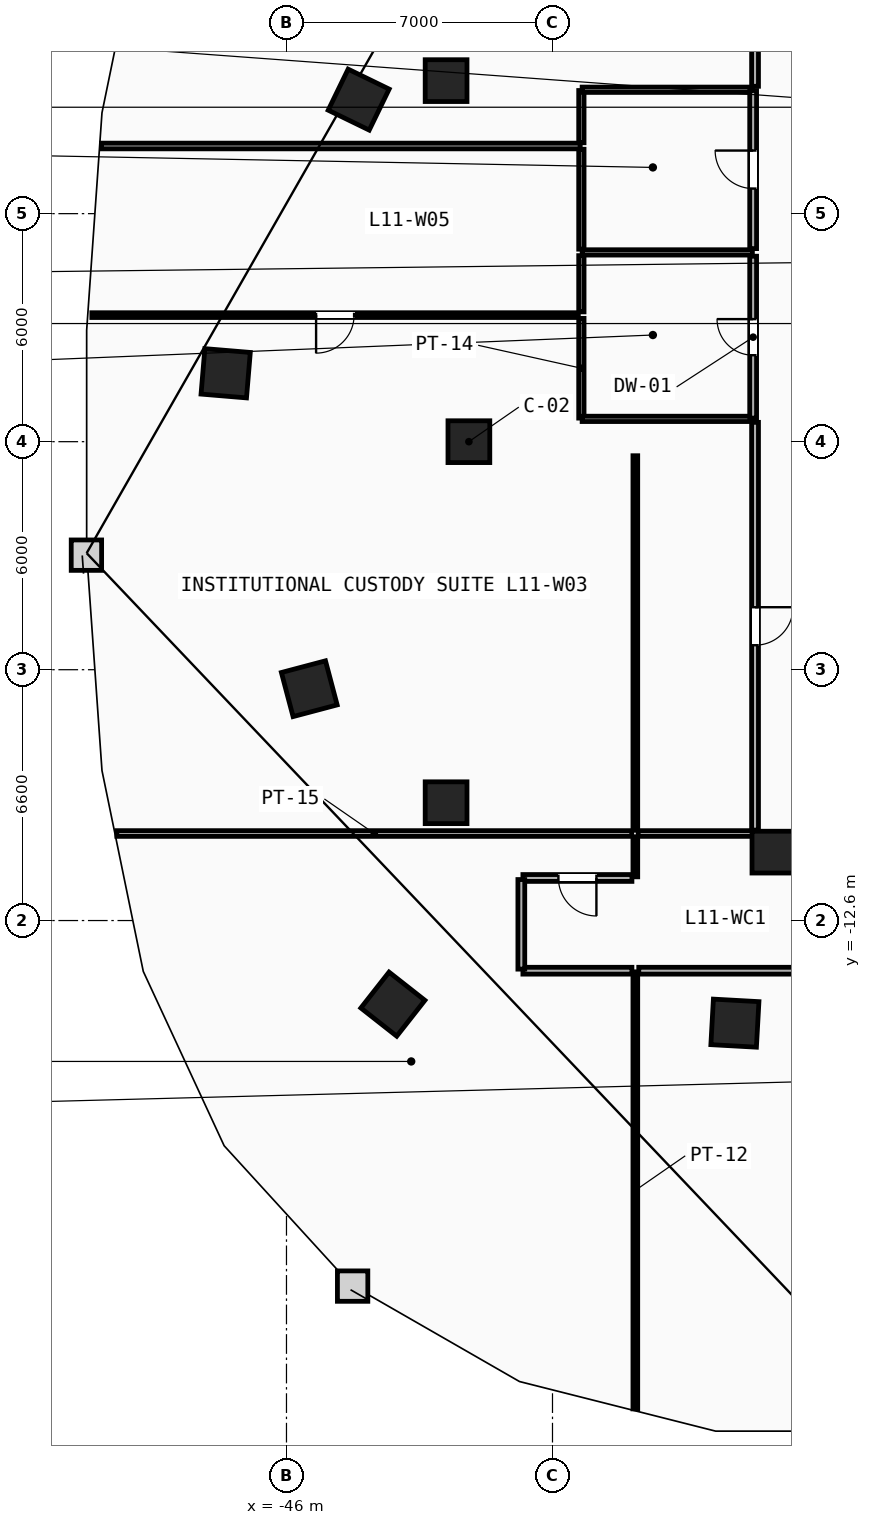
"""IFC4 building model, lengths in metres.
Left out: names, types, materials, properties, quantities, classifications, styles, units other than length and angle.
Written with IfcOpenShell. Run it as: python <this file> out.ifc"""

import sys

from ifc_helpers import new_model, si_unit, direction, frame, frame_2d, origin, origin_2d, place, context, subcontext, project, spatial, rectangle, extrude, element, fill, save


model = new_model("IFC4")
c1 = context("Model", 3, precision=1e-05, world=origin(), true_north=direction((0.0, 1.0)))
c2 = subcontext(c1, "Body", "Model", "MODEL_VIEW")
j1 = project(units=[si_unit("LENGTHUNIT", "METRE"), si_unit("PLANEANGLEUNIT", "RADIAN")], contexts=[c1])
p1 = place(None, origin())
s1 = spatial("IfcSite", under=j1, at=p1, CompositionType="ELEMENT")
p2 = place(p1, origin())
s2 = spatial("IfcBuilding", under=s1, at=p2, CompositionType="ELEMENT")
p3 = place(p2, frame((0.0, 0.0, 46.8)))
s3 = spatial("IfcBuildingStorey", under=s2, at=p3, CompositionType="ELEMENT", Elevation=46.8)
for number, where, z_axis, x_axis in (
    (1, (-41.2, 0.0, 0.0), (0.0, 0.0, 1.0), (1.0, 0.0, 0.0)),
    (2, (-41.8, 9.5, 0.0), (0.0, 0.0, 1.0), (1.0, 0.0, 0.0)),
    (3, (-41.8, -9.5, 0.0), (0.0, 0.0, 1.0), (1.0, 0.0, 0.0)),
    (4, (-33.2, -10.8, 0.0), (0.0, 0.0, 1.0), (1.0, 0.0, 0.0)),
):
    element("IfcColumn", number, at=place(p3, frame(where, z_axis=z_axis, x_axis=x_axis)), inside=s3, PredefinedType="COLUMN", context=c2, shape_type="SweptSolid", body=[
        extrude(rectangle(XDim=1.1, YDim=1.1, at=origin_2d()), origin(), (0.0, 0.0, 1.0), 3.8),
    ])
for number, where, z_axis, x_axis in (
    (5, (-44.1, 9.0, 0.0), (0.0, 0.0, 1.0), (-0.437, -0.899, 0.0)),
    (6, (-47.6, 1.8, 0.0), (0.0, 0.0, 1.0), (-0.084, -0.997, 0.0)),
    (7, (-45.4, -6.5, 0.0), (0.0, 0.0, 1.0), (0.256, -0.967, 0.0)),
    (8, (-43.2, -14.8, 0.0), (0.0, 0.0, 1.0), (0.786, -0.618, 0.0)),
    (9, (-34.2, -15.3, 0.0), (0.0, 0.0, 1.0), (0.998, -0.055, 0.0)),
):
    element("IfcColumn", number, at=place(p3, frame(where, z_axis=z_axis, x_axis=x_axis)), inside=s3, PredefinedType="COLUMN", context=c2, shape_type="SweptSolid", body=[
        extrude(rectangle(XDim=1.2, YDim=1.2, at=origin_2d()), origin(), (0.0, 0.0, 1.0), 3.8),
    ])
p4 = place(p3, frame((-38.24, 0.62, 0.0), z_axis=(0.0, 0.0, 1.0), x_axis=(0.0, 1.0, 0.0)))
e10 = element("IfcWall", 10, at=p4, inside=s3, PredefinedType="PARTITIONING", context=c2, shape_type="SweptSolid", body=[
    extrude(rectangle(XDim=2.625, YDim=0.14, at=frame_2d((1.312, 0.0))), origin(), (0.0, 0.0, 1.0), 3.5),
])
p5 = place(p3, frame((-38.24, 3.415, 0.0), z_axis=(0.0, 0.0, 1.0), x_axis=(0.0, 1.0, 0.0)))
e11 = element("IfcWall", 11, at=p5, inside=s3, PredefinedType="PARTITIONING", context=c2, shape_type="SweptSolid", body=[
    extrude(rectangle(XDim=1.48, YDim=0.14, at=frame_2d((0.74, 0.0))), origin(), (0.0, 0.0, 1.0), 3.5),
])
p6 = place(p3, frame((-38.24, 5.065, 0.0), z_axis=(0.0, 0.0, 1.0), x_axis=(0.0, 1.0, 0.0)))
e12 = element("IfcWall", 12, at=p6, inside=s3, PredefinedType="PARTITIONING", context=c2, shape_type="SweptSolid", body=[
    extrude(rectangle(XDim=2.63, YDim=0.14, at=frame_2d((1.315, 0.0))), origin(), (0.0, 0.0, 1.0), 3.5),
])
p7 = place(p3, frame((-38.24, 7.865, 0.0), z_axis=(0.0, 0.0, 1.0), x_axis=(0.0, 1.0, 0.0)))
e13 = element("IfcWall", 13, at=p7, inside=s3, PredefinedType="PARTITIONING", context=c2, shape_type="SweptSolid", body=[
    extrude(rectangle(XDim=1.375, YDim=0.14, at=frame_2d((0.688, 0.0))), origin(), (0.0, 0.0, 1.0), 3.5),
])
for number, where, z_axis, x_axis in (
    (14, (-38.22, 0.6, 0.0), (0.0, 0.0, 1.0), (1.0, 0.0, 0.0)),
    (15, (-38.22, 4.98, 0.0), (0.0, 0.0, 1.0), (1.0, 0.0, 0.0)),
    (16, (-38.22, 9.26, 0.0), (0.0, 0.0, 1.0), (1.0, 0.0, 0.0)),
):
    element("IfcWall", number, at=place(p3, frame(where, z_axis=z_axis, x_axis=x_axis)), inside=s3, PredefinedType="PARTITIONING", context=c2, shape_type="SweptSolid", body=[
        extrude(rectangle(XDim=4.48, YDim=0.14, at=frame_2d((2.24, 0.0))), origin(), (0.0, 0.0, 1.0), 3.5),
    ])
p8 = place(p3, frame((-33.72, 0.62, 0.0), z_axis=(0.0, 0.0, 1.0), x_axis=(0.0, 1.0, 0.0)))
e17 = element("IfcWall", 17, at=p8, inside=s3, PredefinedType="PARTITIONING", context=c2, shape_type="SweptSolid", body=[
    extrude(rectangle(XDim=4.26, YDim=0.18, at=frame_2d((2.13, 0.0))), origin(), (0.0, 0.0, 1.0), 3.5),
])
p9 = place(p8, frame((1.655, 0.0, 0.0)))
e18 = element("IfcOpeningElement", 18, at=p9, cuts=e17, PredefinedType="OPENING", context=c2, shape_type="SweptSolid", body=[
    extrude(rectangle(XDim=0.95, YDim=2.1, at=frame_2d((0.475, 1.05))), frame((0.0, 0.1, 0.0), z_axis=(0.0, -1.0, 0.0), x_axis=(1.0, 0.0, 0.0)), (0.0, 0.0, 1.0), 0.2),
])
p10 = place(p3, frame((-33.72, 5.08, 0.0), z_axis=(0.0, 0.0, 1.0), x_axis=(0.0, 1.0, 0.0)))
e19 = element("IfcWall", 19, at=p10, inside=s3, PredefinedType="PARTITIONING", context=c2, shape_type="SweptSolid", body=[
    extrude(rectangle(XDim=4.16, YDim=0.18, at=frame_2d((2.08, 0.0))), origin(), (0.0, 0.0, 1.0), 3.5),
])
p11 = place(p10, frame((1.58, 0.0, 0.0)))
e20 = element("IfcOpeningElement", 20, at=p11, cuts=e19, PredefinedType="OPENING", context=c2, shape_type="SweptSolid", body=[
    extrude(rectangle(XDim=1.0, YDim=2.15, at=frame_2d((0.5, 1.075))), frame((0.0, 0.1, 0.0), z_axis=(0.0, -1.0, 0.0), x_axis=(1.0, 0.0, 0.0)), (0.0, 0.0, 1.0), 0.2),
])
p12 = place(p3, frame((-36.82, -25.45, 0.0), z_axis=(0.0, 0.0, 1.0), x_axis=(0.0, 1.0, 0.0)))
e21 = element("IfcWall", 21, at=p12, inside=s3, PredefinedType="PARTITIONING", context=c2, shape_type="SweptSolid", body=[
    extrude(rectangle(XDim=11.5, YDim=0.125, at=frame_2d((5.75, 0.0))), origin(), (0.0, 0.0, 1.0), 3.5),
])
p13 = place(p3, frame((-36.82, -11.45, 0.0), z_axis=(0.0, 0.0, 1.0), x_axis=(0.0, 1.0, 0.0)))
e22 = element("IfcWall", 22, at=p13, inside=s3, PredefinedType="PARTITIONING", context=c2, shape_type="SweptSolid", body=[
    extrude(rectangle(XDim=1.055, YDim=0.125, at=frame_2d((0.527, 0.0))), origin(), (0.0, 0.0, 1.0), 3.5),
])
p14 = place(p3, frame((-36.82, -10.225, 0.0), z_axis=(0.0, 0.0, 1.0), x_axis=(0.0, 1.0, 0.0)))
e23 = element("IfcWall", 23, at=p14, inside=s3, PredefinedType="PARTITIONING", context=c2, shape_type="SweptSolid", body=[
    extrude(rectangle(XDim=9.855, YDim=0.125, at=frame_2d((4.927, 0.0))), origin(), (0.0, 0.0, 1.0), 3.5),
])
p15 = place(p3, frame((-50.464, -10.31, 0.0), z_axis=(0.0, 0.0, 1.0), x_axis=(1.0, 0.0, 0.0)))
e24 = element("IfcWall", 24, at=p15, inside=s3, PredefinedType="PARTITIONING", context=c2, shape_type="SweptSolid", body=[
    extrude(rectangle(XDim=13.549, YDim=0.15, at=frame_2d((6.774, 0.0))), origin(), (0.0, 0.0, 1.0), 2.805),
])
p16 = place(p3, frame((-36.745, -10.31, 0.0), z_axis=(0.0, 0.0, 1.0), x_axis=(1.0, 0.0, 0.0)))
e25 = element("IfcWall", 25, at=p16, inside=s3, PredefinedType="PARTITIONING", context=c2, shape_type="SweptSolid", body=[
    extrude(rectangle(XDim=3.045, YDim=0.15, at=frame_2d((1.522, 0.0))), origin(), (0.0, 0.0, 1.0), 2.805),
])
p17 = place(p3, frame((-50.866, 7.78, 0.0), z_axis=(0.0, 0.0, 1.0), x_axis=(1.0, 0.0, 0.0)))
e26 = element("IfcWall", 26, at=p17, inside=s3, PredefinedType="PARTITIONING", context=c2, shape_type="SweptSolid", body=[
    extrude(rectangle(XDim=12.596, YDim=0.15, at=frame_2d((6.298, 0.0))), origin(), (0.0, 0.0, 1.0), 3.5),
])
p18 = place(p3, frame((-36.73, -13.92, 0.0), z_axis=(0.0, 0.0, 1.0), x_axis=(1.0, 0.0, 0.0)))
e27 = element("IfcWall", 27, at=p18, inside=s3, PredefinedType="PARTITIONING", context=c2, shape_type="SweptSolid", body=[
    extrude(rectangle(XDim=11.509, YDim=0.18, at=frame_2d((5.754, 0.0))), origin(), (0.0, 0.0, 1.0), 3.5),
])
p19 = place(p18, frame((5.254, 0.0, 0.0)))
e28 = element("IfcOpeningElement", 28, at=p19, cuts=e27, PredefinedType="OPENING", context=c2, shape_type="SweptSolid", body=[
    extrude(rectangle(XDim=1.0, YDim=2.15, at=frame_2d((0.5, 1.075))), frame((0.0, 0.1, 0.0), z_axis=(0.0, -1.0, 0.0), x_axis=(1.0, 0.0, 0.0)), (0.0, 0.0, 1.0), 0.2),
])
p20 = place(p3, frame((-36.91, -11.48, 0.0), z_axis=(0.0, 0.0, 1.0), x_axis=(-1.0, 0.0, 0.0)))
e29 = element("IfcWall", 29, at=p20, inside=s3, PredefinedType="PARTITIONING", context=c2, shape_type="SweptSolid", body=[
    extrude(rectangle(XDim=2.869, YDim=0.18, at=frame_2d((1.434, 0.0))), origin(), (0.0, 0.0, 1.0), 3.5),
])
p21 = place(p20, frame((0.934, 0.0, 0.0)))
e30 = element("IfcOpeningElement", 30, at=p21, cuts=e29, PredefinedType="OPENING", context=c2, shape_type="SweptSolid", body=[
    extrude(rectangle(XDim=1.0, YDim=2.15, at=frame_2d((0.5, 1.075))), frame((0.0, 0.1, 0.0), z_axis=(0.0, -1.0, 0.0), x_axis=(1.0, 0.0, 0.0)), (0.0, 0.0, 1.0), 0.2),
])
p22 = place(p3, frame((-39.779, -13.92, 0.0), z_axis=(0.0, 0.0, 1.0), x_axis=(1.0, 0.0, 0.0)))
e31 = element("IfcWall", 31, at=p22, inside=s3, PredefinedType="PARTITIONING", context=c2, shape_type="SweptSolid", body=[
    extrude(rectangle(XDim=2.869, YDim=0.18, at=frame_2d((1.434, 0.0))), origin(), (0.0, 0.0, 1.0), 3.5),
])
p23 = place(p3, frame((-39.82, -11.521, 0.0), z_axis=(0.0, 0.0, 1.0), x_axis=(0.0, -1.0, 0.0)))
e32 = element("IfcWall", 32, at=p23, inside=s3, PredefinedType="PARTITIONING", context=c2, shape_type="SweptSolid", body=[
    extrude(rectangle(XDim=2.357, YDim=0.18, at=frame_2d((1.178, 0.0))), origin(), (0.0, 0.0, 1.0), 3.5),
])
p24 = place(p3, frame((-33.67, 0.509, 0.0), z_axis=(0.0, 0.0, 1.0), x_axis=(0.0, -1.0, 0.0)))
e33 = element("IfcWall", 33, at=p24, inside=s3, PredefinedType="PARTITIONING", context=c2, shape_type="SweptSolid", body=[
    extrude(rectangle(XDim=10.729, YDim=0.18, at=frame_2d((5.364, 0.0))), origin(), (0.0, 0.0, 1.0), 3.5),
])
p25 = place(p24, frame((4.864, 0.0, 0.0)))
e34 = element("IfcOpeningElement", 34, at=p25, cuts=e33, PredefinedType="OPENING", context=c2, shape_type="SweptSolid", body=[
    extrude(rectangle(XDim=1.0, YDim=2.15, at=frame_2d((0.5, 1.075))), frame((0.0, 0.1, 0.0), z_axis=(0.0, -1.0, 0.0), x_axis=(1.0, 0.0, 0.0)), (0.0, 0.0, 1.0), 0.2),
])
p26 = place(p3, frame((-33.67, 17.428, 0.0), z_axis=(0.0, 0.0, 1.0), x_axis=(0.0, -1.0, 0.0)))
e35 = element("IfcWall", 35, at=p26, inside=s3, PredefinedType="PARTITIONING", context=c2, shape_type="SweptSolid", body=[
    extrude(rectangle(XDim=8.077, YDim=0.18, at=frame_2d((4.039, 0.0))), origin(), (0.0, 0.0, 1.0), 3.5),
])
p27 = place(p26, frame((3.539, 0.0, 0.0)))
e36 = element("IfcOpeningElement", 36, at=p27, cuts=e35, PredefinedType="OPENING", context=c2, shape_type="SweptSolid", body=[
    extrude(rectangle(XDim=1.0, YDim=2.15, at=frame_2d((0.5, 1.075))), frame((0.0, 0.1, 0.0), z_axis=(0.0, -1.0, 0.0), x_axis=(1.0, 0.0, 0.0)), (0.0, 0.0, 1.0), 0.2),
])
p28 = place(p3, frame((-38.32, 3.33, 0.0), z_axis=(0.0, 0.0, 1.0), x_axis=(-1.0, 0.0, 0.0)))
e37 = element("IfcWall", 37, at=p28, inside=s3, PredefinedType="PARTITIONING", context=c2, shape_type="SweptSolid", body=[
    extrude(rectangle(XDim=12.801, YDim=0.125, at=frame_2d((6.401, 0.0))), origin(), (0.0, 0.0, 1.0), 3.5),
])
p29 = place(p28, frame((5.901, 0.0, 0.0)))
e38 = element("IfcOpeningElement", 38, at=p29, cuts=e37, PredefinedType="OPENING", context=c2, shape_type="SweptSolid", body=[
    extrude(rectangle(XDim=1.0, YDim=2.15, at=frame_2d((0.5, 1.075))), frame((0.0, 0.073, 0.0), z_axis=(0.0, -1.0, 0.0), x_axis=(1.0, 0.0, 0.0)), (0.0, 0.0, 1.0), 0.145),
])
p30 = place(p29, origin())
e39 = element("IfcDoor", 39, at=p30, inside=s3, OperationType="SINGLE_SWING_RIGHT", PredefinedType="DOOR", context=c2, shape_type="SweptSolid", body=[
    extrude(rectangle(XDim=1.0, YDim=2.15, at=frame_2d((0.5, 1.075))), frame((0.0, 0.025, 0.0), z_axis=(0.0, -1.0, 0.0), x_axis=(1.0, 0.0, 0.0)), (0.0, 0.0, 1.0), 0.05),
])
fill(e38, e39)
p31 = place(p25, origin())
e40 = element("IfcDoor", 40, at=p31, inside=s3, OperationType="SINGLE_SWING_LEFT", PredefinedType="DOOR", context=c2, shape_type="SweptSolid", body=[
    extrude(rectangle(XDim=1.0, YDim=2.15, at=frame_2d((0.5, 1.075))), frame((0.0, 0.025, 0.0), z_axis=(0.0, -1.0, 0.0), x_axis=(1.0, 0.0, 0.0)), (0.0, 0.0, 1.0), 0.05),
])
fill(e34, e40)
p32 = place(p9, origin())
e41 = element("IfcDoor", 41, at=p32, inside=s3, OperationType="SINGLE_SWING_RIGHT", PredefinedType="DOOR", context=c2, shape_type="SweptSolid", body=[
    extrude(rectangle(XDim=0.95, YDim=2.1, at=frame_2d((0.475, 1.05))), frame((0.0, 0.025, 0.0), z_axis=(0.0, -1.0, 0.0), x_axis=(1.0, 0.0, 0.0)), (0.0, 0.0, 1.0), 0.05),
])
fill(e18, e41)
p33 = place(p11, origin())
e42 = element("IfcDoor", 42, at=p33, inside=s3, OperationType="SINGLE_SWING_RIGHT", PredefinedType="DOOR", context=c2, shape_type="SweptSolid", body=[
    extrude(rectangle(XDim=1.0, YDim=2.15, at=frame_2d((0.5, 1.075))), frame((0.0, 0.025, 0.0), z_axis=(0.0, -1.0, 0.0), x_axis=(1.0, 0.0, 0.0)), (0.0, 0.0, 1.0), 0.05),
])
fill(e20, e42)
p34 = place(p21, origin())
e43 = element("IfcDoor", 43, at=p34, inside=s3, OperationType="SINGLE_SWING_LEFT", PredefinedType="DOOR", context=c2, shape_type="SweptSolid", body=[
    extrude(rectangle(XDim=1.0, YDim=2.15, at=frame_2d((0.5, 1.075))), frame((0.0, 0.025, 0.0), z_axis=(0.0, -1.0, 0.0), x_axis=(1.0, 0.0, 0.0)), (0.0, 0.0, 1.0), 0.05),
])
fill(e30, e43)
save(model, sys.argv[1])
